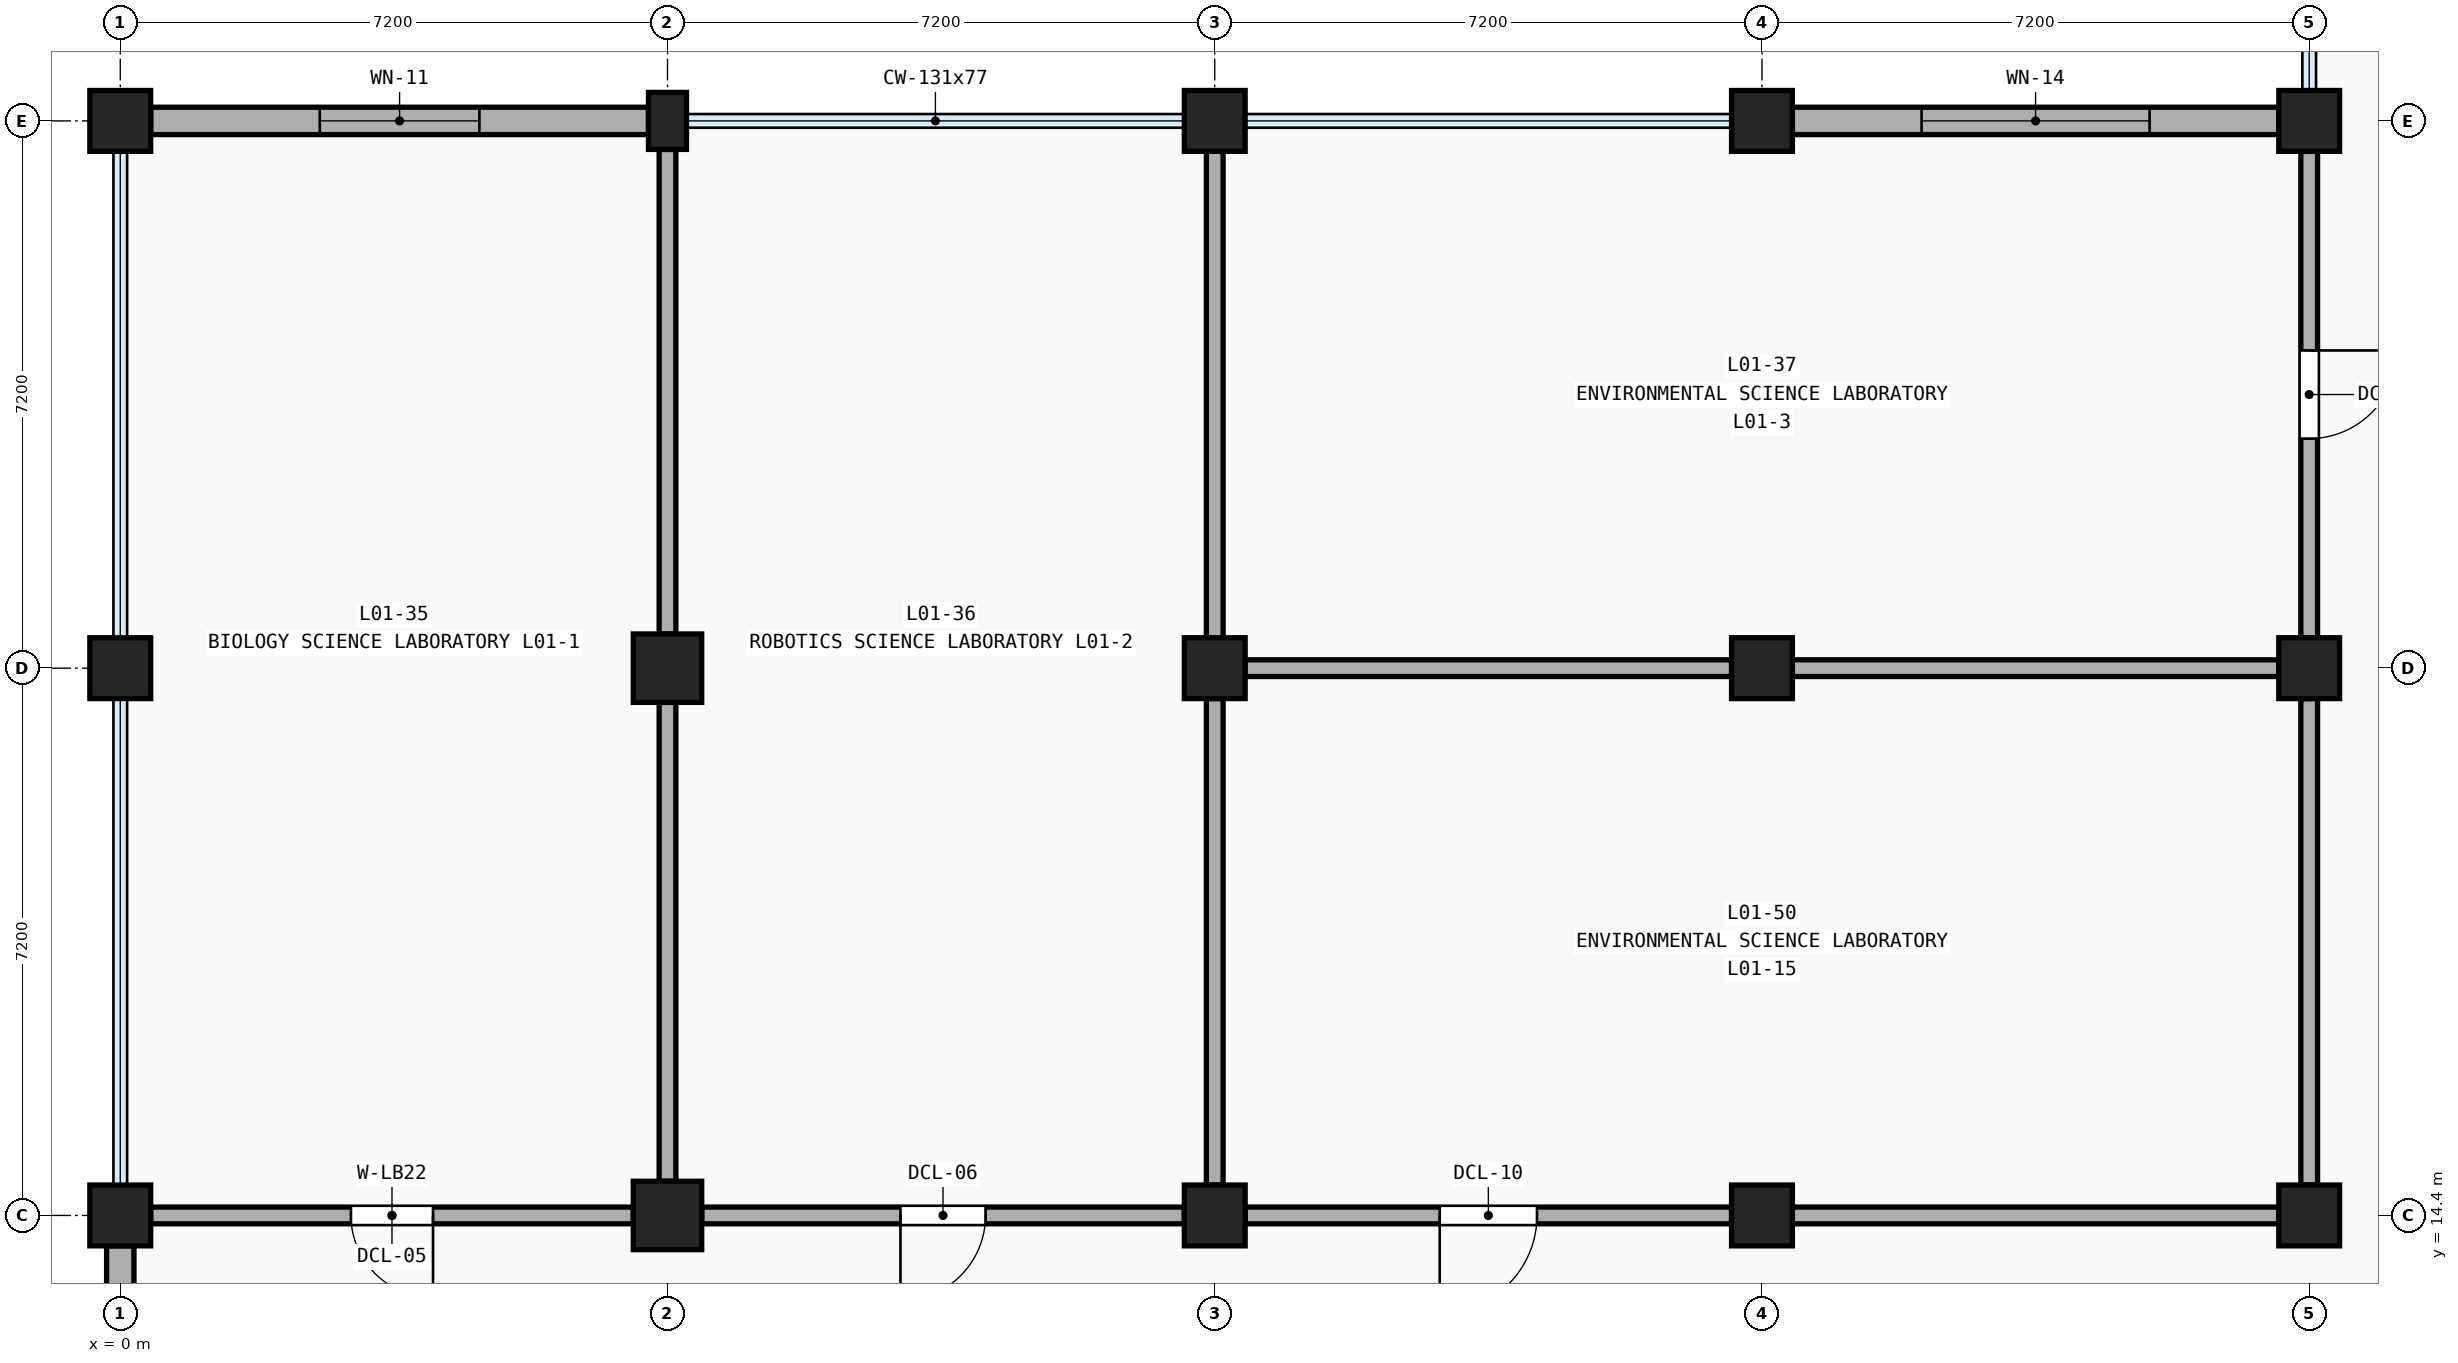
"""IFC4 building model, lengths in metres.
Left out: names, types, materials, properties, quantities, classifications, styles, units other than length and angle.
Written with IfcOpenShell. Run it as: python <this file> out.ifc"""

import sys

from ifc_helpers import new_model, si_unit, direction, frame, frame_2d, origin, origin_2d, place, context, subcontext, project, spatial, rectangle, extrude, element, fill, save


model = new_model("IFC4")
c1 = context("Model", 3, precision=1e-05, world=origin(), true_north=direction((0.0, 1.0)))
c2 = subcontext(c1, "Body", "Model", "MODEL_VIEW")
j1 = project(units=[si_unit("LENGTHUNIT", "METRE"), si_unit("PLANEANGLEUNIT", "RADIAN")], contexts=[c1])
p1 = place(None, origin())
s1 = spatial("IfcSite", under=j1, at=p1, CompositionType="ELEMENT")
p2 = place(p1, origin())
s2 = spatial("IfcBuilding", under=s1, at=p2, CompositionType="ELEMENT")
p3 = place(p2, frame((0.0, 0.0, 4.8)))
s3 = spatial("IfcBuildingStorey", under=s2, at=p3, CompositionType="ELEMENT", Elevation=4.8)
for number, where, z_axis, x_axis in (
    (1, (0.0, 14.4, 0.0), (0.0, 0.0, 1.0), (1.0, 0.0, 0.0)),
    (2, (0.0, 21.6, 0.0), (0.0, 0.0, 1.0), (1.0, 0.0, 0.0)),
    (3, (0.0, 28.8, 0.0), (0.0, 0.0, 1.0), (1.0, 0.0, 0.0)),
):
    element("IfcColumn", number, at=place(p3, frame(where, z_axis=z_axis, x_axis=x_axis)), inside=s3, PredefinedType="COLUMN", context=c2, shape_type="SweptSolid", body=[
        extrude(rectangle(XDim=0.8, YDim=0.8, at=origin_2d()), origin(), (0.0, 0.0, 1.0), 4.8),
    ])
for number, where, z_axis, x_axis in (
    (4, (7.2, 14.4, 0.0), (0.0, 0.0, 1.0), (1.0, 0.0, 0.0)),
    (5, (7.2, 21.6, 0.0), (0.0, 0.0, 1.0), (1.0, 0.0, 0.0)),
):
    element("IfcColumn", number, at=place(p3, frame(where, z_axis=z_axis, x_axis=x_axis)), inside=s3, PredefinedType="COLUMN", context=c2, shape_type="SweptSolid", body=[
        extrude(rectangle(XDim=0.9, YDim=0.9, at=origin_2d()), origin(), (0.0, 0.0, 1.0), 4.8),
    ])
p4 = place(p3, frame((7.2, 28.8, 0.0), z_axis=(0.0, 0.0, 1.0), x_axis=(1.0, 0.0, 0.0)))
e6 = element("IfcColumn", 6, at=p4, inside=s3, PredefinedType="PILASTER", context=c2, shape_type="SweptSolid", body=[
    extrude(rectangle(XDim=0.5, YDim=0.75, at=origin_2d()), origin(), (0.0, 0.0, 1.0), 4.8),
])
for number, where, z_axis, x_axis in (
    (7, (14.4, 14.4, 0.0), (0.0, 0.0, 1.0), (1.0, 0.0, 0.0)),
    (8, (14.4, 21.6, 0.0), (0.0, 0.0, 1.0), (1.0, 0.0, 0.0)),
    (9, (14.4, 28.8, 0.0), (0.0, 0.0, 1.0), (1.0, 0.0, 0.0)),
    (10, (21.6, 14.4, 0.0), (0.0, 0.0, 1.0), (1.0, 0.0, 0.0)),
    (11, (21.6, 21.6, 0.0), (0.0, 0.0, 1.0), (1.0, 0.0, 0.0)),
    (12, (21.6, 28.8, 0.0), (0.0, 0.0, 1.0), (1.0, 0.0, 0.0)),
    (13, (28.8, 14.4, 0.0), (0.0, 0.0, 1.0), (1.0, 0.0, 0.0)),
    (14, (28.8, 21.6, 0.0), (0.0, 0.0, 1.0), (1.0, 0.0, 0.0)),
    (15, (28.8, 28.8, 0.0), (0.0, 0.0, 1.0), (1.0, 0.0, 0.0)),
):
    element("IfcColumn", number, at=place(p3, frame(where, z_axis=z_axis, x_axis=x_axis)), inside=s3, PredefinedType="COLUMN", context=c2, shape_type="SweptSolid", body=[
        extrude(rectangle(XDim=0.8, YDim=0.8, at=origin_2d()), origin(), (0.0, 0.0, 1.0), 4.8),
    ])
p5 = place(p3, frame((0.0, 7.6, 0.0), z_axis=(0.0, 0.0, 1.0), x_axis=(0.0, 1.0, 0.0)))
e16 = element("IfcWall", 16, at=p5, inside=s3, PredefinedType="SOLIDWALL", context=c2, shape_type="SweptSolid", body=[
    extrude(rectangle(XDim=6.4, YDim=0.36, at=frame_2d((3.2, 0.0))), origin(), (0.0, 0.0, 1.0), 3.85),
])
p6 = place(p5, frame((1.6, 0.0, 0.9)))
e17 = element("IfcOpeningElement", 17, at=p6, cuts=e16, PredefinedType="OPENING", context=c2, shape_type="SweptSolid", body=[
    extrude(rectangle(XDim=3.2, YDim=1.8, at=frame_2d((1.6, 0.9))), frame((0.0, 0.192, 0.0), z_axis=(0.0, -1.0, 0.0), x_axis=(1.0, 0.0, 0.0)), (0.0, 0.0, 1.0), 0.384),
])
p7 = place(p3, frame((0.4, 28.8, 0.0), z_axis=(0.0, 0.0, 1.0), x_axis=(1.0, 0.0, 0.0)))
e18 = element("IfcWall", 18, at=p7, inside=s3, PredefinedType="SOLIDWALL", context=c2, shape_type="SweptSolid", body=[
    extrude(rectangle(XDim=6.55, YDim=0.36, at=frame_2d((3.275, 0.0))), origin(), (0.0, 0.0, 1.0), 3.85),
])
p8 = place(p7, frame((2.225, 0.0, 0.85)))
e19 = element("IfcOpeningElement", 19, at=p8, cuts=e18, PredefinedType="OPENING", context=c2, shape_type="SweptSolid", body=[
    extrude(rectangle(XDim=2.1, YDim=2.0, at=frame_2d((1.05, 1.0))), frame((0.0, 0.192, 0.0), z_axis=(0.0, -1.0, 0.0), x_axis=(1.0, 0.0, 0.0)), (0.0, 0.0, 1.0), 0.384),
])
p9 = place(p3, frame((22.0, 28.8, 0.0), z_axis=(0.0, 0.0, 1.0), x_axis=(1.0, 0.0, 0.0)))
e20 = element("IfcWall", 20, at=p9, inside=s3, PredefinedType="SOLIDWALL", context=c2, shape_type="SweptSolid", body=[
    extrude(rectangle(XDim=6.4, YDim=0.36, at=frame_2d((3.2, 0.0))), origin(), (0.0, 0.0, 1.0), 3.85),
])
p10 = place(p9, frame((1.7, 0.0, 0.85)))
e21 = element("IfcOpeningElement", 21, at=p10, cuts=e20, PredefinedType="OPENING", context=c2, shape_type="SweptSolid", body=[
    extrude(rectangle(XDim=3.0, YDim=2.0, at=frame_2d((1.5, 1.0))), frame((0.0, 0.192, 0.0), z_axis=(0.0, -1.0, 0.0), x_axis=(1.0, 0.0, 0.0)), (0.0, 0.0, 1.0), 0.384),
])
p11 = place(p3, frame((0.4, 14.4, 0.0), z_axis=(0.0, 0.0, 1.0), x_axis=(1.0, 0.0, 0.0)))
e22 = element("IfcWall", 22, at=p11, inside=s3, PredefinedType="PARTITIONING", context=c2, shape_type="SweptSolid", body=[
    extrude(rectangle(XDim=6.35, YDim=0.22, at=frame_2d((3.175, 0.0))), origin(), (0.0, 0.0, 1.0), 3.58),
])
p12 = place(p11, frame((2.635, 0.0, 0.0)))
e23 = element("IfcOpeningElement", 23, at=p12, cuts=e22, PredefinedType="OPENING", context=c2, shape_type="SweptSolid", body=[
    extrude(rectangle(XDim=1.08, YDim=2.18, at=frame_2d((0.54, 1.09))), frame((0.0, 0.122, 0.0), z_axis=(0.0, -1.0, 0.0), x_axis=(1.0, 0.0, 0.0)), (0.0, 0.0, 1.0), 0.244),
])
p13 = place(p3, frame((7.2, 14.85, 0.0), z_axis=(0.0, 0.0, 1.0), x_axis=(0.0, 1.0, 0.0)))
e24 = element("IfcWall", 24, at=p13, inside=s3, PredefinedType="PARTITIONING", context=c2, shape_type="SweptSolid", body=[
    extrude(rectangle(XDim=6.3, YDim=0.22, at=frame_2d((3.15, 0.0))), origin(), (0.0, 0.0, 1.0), 3.58),
])
p14 = place(p3, frame((7.2, 22.05, 0.0), z_axis=(0.0, 0.0, 1.0), x_axis=(0.0, 1.0, 0.0)))
e25 = element("IfcWall", 25, at=p14, inside=s3, PredefinedType="PARTITIONING", context=c2, shape_type="SweptSolid", body=[
    extrude(rectangle(XDim=6.375, YDim=0.22, at=frame_2d((3.188, 0.0))), origin(), (0.0, 0.0, 1.0), 3.58),
])
p15 = place(p3, frame((7.65, 14.4, 0.0), z_axis=(0.0, 0.0, 1.0), x_axis=(1.0, 0.0, 0.0)))
e26 = element("IfcWall", 26, at=p15, inside=s3, PredefinedType="PARTITIONING", context=c2, shape_type="SweptSolid", body=[
    extrude(rectangle(XDim=6.35, YDim=0.22, at=frame_2d((3.175, 0.0))), origin(), (0.0, 0.0, 1.0), 3.58),
])
p16 = place(p15, frame((2.615, 0.0, 0.0)))
e27 = element("IfcOpeningElement", 27, at=p16, cuts=e26, PredefinedType="OPENING", context=c2, shape_type="SweptSolid", body=[
    extrude(rectangle(XDim=1.12, YDim=2.2, at=frame_2d((0.56, 1.1))), frame((0.0, 0.122, 0.0), z_axis=(0.0, -1.0, 0.0), x_axis=(1.0, 0.0, 0.0)), (0.0, 0.0, 1.0), 0.244),
])
for number, where, z_axis, x_axis in (
    (28, (14.4, 14.8, 0.0), (0.0, 0.0, 1.0), (0.0, 1.0, 0.0)),
    (29, (14.4, 22.0, 0.0), (0.0, 0.0, 1.0), (0.0, 1.0, 0.0)),
    (30, (14.8, 21.6, 0.0), (0.0, 0.0, 1.0), (1.0, 0.0, 0.0)),
    (31, (22.0, 21.6, 0.0), (0.0, 0.0, 1.0), (1.0, 0.0, 0.0)),
):
    element("IfcWall", number, at=place(p3, frame(where, z_axis=z_axis, x_axis=x_axis)), inside=s3, PredefinedType="PARTITIONING", context=c2, shape_type="SweptSolid", body=[
        extrude(rectangle(XDim=6.4, YDim=0.22, at=frame_2d((3.2, 0.0))), origin(), (0.0, 0.0, 1.0), 3.58),
    ])
p17 = place(p3, frame((28.8, 22.0, 0.0), z_axis=(0.0, 0.0, 1.0), x_axis=(0.0, 1.0, 0.0)))
e32 = element("IfcWall", 32, at=p17, inside=s3, PredefinedType="PARTITIONING", context=c2, shape_type="SweptSolid", body=[
    extrude(rectangle(XDim=6.4, YDim=0.22, at=frame_2d((3.2, 0.0))), origin(), (0.0, 0.0, 1.0), 3.58),
])
p18 = place(p17, frame((2.62, 0.0, 0.0)))
e33 = element("IfcOpeningElement", 33, at=p18, cuts=e32, PredefinedType="OPENING", context=c2, shape_type="SweptSolid", body=[
    extrude(rectangle(XDim=1.16, YDim=2.22, at=frame_2d((0.58, 1.11))), frame((0.0, 0.122, 0.0), z_axis=(0.0, -1.0, 0.0), x_axis=(1.0, 0.0, 0.0)), (0.0, 0.0, 1.0), 0.244),
])
p19 = place(p3, frame((14.8, 14.4, 0.0), z_axis=(0.0, 0.0, 1.0), x_axis=(1.0, 0.0, 0.0)))
e34 = element("IfcWall", 34, at=p19, inside=s3, PredefinedType="PARTITIONING", context=c2, shape_type="SweptSolid", body=[
    extrude(rectangle(XDim=6.4, YDim=0.22, at=frame_2d((3.2, 0.0))), origin(), (0.0, 0.0, 1.0), 3.58),
])
p20 = place(p19, frame((2.56, 0.0, 0.0)))
e35 = element("IfcOpeningElement", 35, at=p20, cuts=e34, PredefinedType="OPENING", context=c2, shape_type="SweptSolid", body=[
    extrude(rectangle(XDim=1.28, YDim=2.28, at=frame_2d((0.64, 1.14))), frame((0.0, 0.122, 0.0), z_axis=(0.0, -1.0, 0.0), x_axis=(1.0, 0.0, 0.0)), (0.0, 0.0, 1.0), 0.244),
])
for number, where, z_axis, x_axis in (
    (36, (22.0, 14.4, 0.0), (0.0, 0.0, 1.0), (1.0, 0.0, 0.0)),
    (37, (28.8, 14.8, 0.0), (0.0, 0.0, 1.0), (0.0, 1.0, 0.0)),
):
    element("IfcWall", number, at=place(p3, frame(where, z_axis=z_axis, x_axis=x_axis)), inside=s3, PredefinedType="PARTITIONING", context=c2, shape_type="SweptSolid", body=[
        extrude(rectangle(XDim=6.4, YDim=0.22, at=frame_2d((3.2, 0.0))), origin(), (0.0, 0.0, 1.0), 3.58),
    ])
p21 = place(p8, origin())
e38 = element("IfcWindow", 38, at=p21, inside=s3, PartitioningType="SINGLE_PANEL", PredefinedType="WINDOW", context=c2, shape_type="SweptSolid", body=[
    extrude(rectangle(XDim=2.1, YDim=2.0, at=frame_2d((1.05, 1.0))), frame((0.0, 0.03, 0.0), z_axis=(0.0, -1.0, 0.0), x_axis=(1.0, 0.0, 0.0)), (0.0, 0.0, 1.0), 0.06),
])
fill(e19, e38)
p22 = place(p10, origin())
e39 = element("IfcWindow", 39, at=p22, inside=s3, PartitioningType="SINGLE_PANEL", PredefinedType="WINDOW", context=c2, shape_type="SweptSolid", body=[
    extrude(rectangle(XDim=3.0, YDim=2.0, at=frame_2d((1.5, 1.0))), frame((0.0, 0.03, 0.0), z_axis=(0.0, -1.0, 0.0), x_axis=(1.0, 0.0, 0.0)), (0.0, 0.0, 1.0), 0.06),
])
fill(e21, e39)
p23 = place(p12, frame((1.08, 0.0, 0.0), z_axis=(0.0, 0.0, 1.0), x_axis=(-1.0, 0.0, 0.0)))
e40 = element("IfcDoor", 40, at=p23, inside=s3, OperationType="SINGLE_SWING_LEFT", PredefinedType="DOOR", context=c2, shape_type="SweptSolid", body=[
    extrude(rectangle(XDim=1.08, YDim=2.18, at=frame_2d((0.54, 1.09))), frame((0.0, 0.025, 0.0), z_axis=(0.0, -1.0, 0.0), x_axis=(1.0, 0.0, 0.0)), (0.0, 0.0, 1.0), 0.05),
])
fill(e23, e40)
p24 = place(p16, frame((1.12, 0.0, 0.0), z_axis=(0.0, 0.0, 1.0), x_axis=(-1.0, 0.0, 0.0)))
e41 = element("IfcDoor", 41, at=p24, inside=s3, OperationType="SINGLE_SWING_RIGHT", PredefinedType="DOOR", context=c2, shape_type="SweptSolid", body=[
    extrude(rectangle(XDim=1.12, YDim=2.2, at=frame_2d((0.56, 1.1))), frame((0.0, 0.025, 0.0), z_axis=(0.0, -1.0, 0.0), x_axis=(1.0, 0.0, 0.0)), (0.0, 0.0, 1.0), 0.05),
])
fill(e27, e41)
p25 = place(p18, frame((1.16, 0.0, 0.0), z_axis=(0.0, 0.0, 1.0), x_axis=(-1.0, 0.0, 0.0)))
e42 = element("IfcDoor", 42, at=p25, inside=s3, OperationType="SINGLE_SWING_LEFT", PredefinedType="DOOR", context=c2, shape_type="SweptSolid", body=[
    extrude(rectangle(XDim=1.16, YDim=2.22, at=frame_2d((0.58, 1.11))), frame((0.0, 0.025, 0.0), z_axis=(0.0, -1.0, 0.0), x_axis=(1.0, 0.0, 0.0)), (0.0, 0.0, 1.0), 0.05),
])
fill(e33, e42)
p26 = place(p20, frame((1.28, 0.0, 0.0), z_axis=(0.0, 0.0, 1.0), x_axis=(-1.0, 0.0, 0.0)))
e43 = element("IfcDoor", 43, at=p26, inside=s3, OperationType="SINGLE_SWING_RIGHT", PredefinedType="DOOR", context=c2, shape_type="SweptSolid", body=[
    extrude(rectangle(XDim=1.28, YDim=2.28, at=frame_2d((0.64, 1.14))), frame((0.0, 0.025, 0.0), z_axis=(0.0, -1.0, 0.0), x_axis=(1.0, 0.0, 0.0)), (0.0, 0.0, 1.0), 0.05),
])
fill(e35, e43)
save(model, sys.argv[1])
